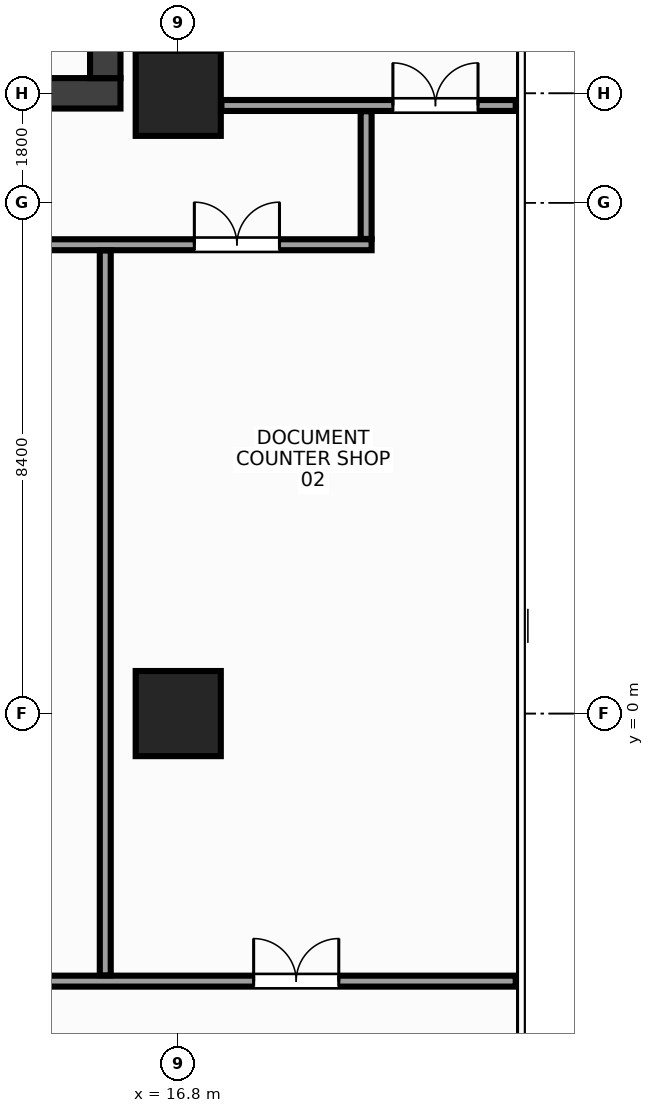
"""IFC4 building model, lengths in metres.
Left out: names, types, materials, properties, quantities, classifications, styles, units other than length and angle.
Written with IfcOpenShell. Run it as: python <this file> out.ifc"""

import sys

from ifc_helpers import new_model, si_unit, direction, frame, frame_2d, origin, origin_2d, place, context, subcontext, project, spatial, rectangle, extrude, source, transform, mapped, element, fill, save


model = new_model("IFC4")
c1 = context("Model", 3, precision=1e-05, world=origin(), true_north=direction((0.0, 1.0)))
c2 = subcontext(c1, "Body", "Model", "MODEL_VIEW")
j1 = project(units=[si_unit("LENGTHUNIT", "METRE"), si_unit("PLANEANGLEUNIT", "RADIAN")], contexts=[c1])
p1 = place(None, origin())
s1 = spatial("IfcSite", under=j1, at=p1, CompositionType="ELEMENT")
p2 = place(p1, origin())
s2 = spatial("IfcBuilding", under=s1, at=p2, CompositionType="ELEMENT")
p3 = place(p2, frame((0.0, 0.0, 264.8)))
s3 = spatial("IfcBuildingStorey", under=s2, at=p3, CompositionType="ELEMENT", Elevation=264.8)
m1 = source(origin(), c2, "Body", "SweptSolid", [
    extrude(rectangle(XDim=31.7, YDim=0.5, at=frame_2d((15.85, 0.0))), origin(), (0.0, 0.0, 1.0), 3.6),
])
p4 = place(p3, frame((-15.85, 10.2, 0.0), z_axis=(0.0, 0.0, 1.0), x_axis=(1.0, 0.0, 0.0)))
e1 = element("IfcWall", 1, at=p4, inside=s3, PredefinedType="SHEAR", context=c2, shape_type="MappedRepresentation", body=[
    mapped(m1, transform((0.0, 0.0, 0.0), x_axis=(1.0, 0.0, 0.0), y_axis=(0.0, 1.0, 0.0), z_axis=(0.0, 0.0, 1.0), scale=1.0)),
])
p5 = place(p4, frame((1.7, 0.0, 0.0)))
e2 = element("IfcOpeningElement", 2, at=p5, cuts=e1, PredefinedType="OPENING", context=c2, shape_type="SweptSolid", body=[
    extrude(rectangle(XDim=1.6, YDim=2.15, at=frame_2d((0.8, 1.075))), frame((0.0, 0.262, 0.0), z_axis=(0.0, -1.0, 0.0), x_axis=(1.0, 0.0, 0.0)), (0.0, 0.0, 1.0), 0.524),
])
p6 = place(p4, frame((28.4, 0.0, 0.0)))
e3 = element("IfcOpeningElement", 3, at=p6, cuts=e1, PredefinedType="OPENING", context=c2, shape_type="SweptSolid", body=[
    extrude(rectangle(XDim=1.6, YDim=2.15, at=frame_2d((0.8, 1.075))), frame((0.0, 0.262, 0.0), z_axis=(0.0, -1.0, 0.0), x_axis=(1.0, 0.0, 0.0)), (0.0, 0.0, 1.0), 0.524),
])
p7 = place(p4, frame((15.1, 0.0, 0.0)))
e4 = element("IfcOpeningElement", 4, at=p7, cuts=e1, PredefinedType="OPENING", context=c2, shape_type="SweptSolid", body=[
    extrude(rectangle(XDim=1.5, YDim=2.2, at=frame_2d((0.75, 1.1))), frame((0.0, 0.262, 0.0), z_axis=(0.0, -1.0, 0.0), x_axis=(1.0, 0.0, 0.0)), (0.0, 0.0, 1.0), 0.524),
])
m2 = source(origin(), c2, "Body", "SweptSolid", [
    extrude(rectangle(XDim=13.1, YDim=0.5, at=frame_2d((6.55, 0.0))), origin(), (0.0, 0.0, 1.0), 3.6),
])
p8 = place(p3, frame((15.6, 10.45, 0.0), z_axis=(0.0, 0.0, 1.0), x_axis=(0.0, 1.0, 0.0)))
e5 = element("IfcWall", 5, at=p8, inside=s3, PredefinedType="SHEAR", context=c2, shape_type="MappedRepresentation", body=[
    mapped(m2, transform((0.0, 0.0, 0.0), x_axis=(1.0, 0.0, 0.0), y_axis=(0.0, 1.0, 0.0), z_axis=(0.0, 0.0, 1.0), scale=1.0)),
])
m3 = source(origin(), c2, "Body", "SweptSolid", [
    extrude(rectangle(XDim=1.4, YDim=1.4, at=origin_2d()), origin(), (0.0, 0.0, 1.0), 3.6),
])
for number, where, z_axis, x_axis in (
    (6, (16.8, 0.0, 0.0), (0.0, 0.0, 1.0), (1.0, 0.0, 0.0)),
    (7, (16.8, 10.2, 0.0), (0.0, 0.0, 1.0), (1.0, 0.0, 0.0)),
):
    element("IfcColumn", number, at=place(p3, frame(where, z_axis=z_axis, x_axis=x_axis)), inside=s3, PredefinedType="COLUMN", context=c2, shape_type="MappedRepresentation", body=[
        mapped(m3, transform((0.0, 0.0, 0.0), x_axis=(1.0, 0.0, 0.0), y_axis=(0.0, 1.0, 0.0), z_axis=(0.0, 0.0, 1.0), scale=1.0)),
    ])
m4 = source(origin(), c2, "Body", "SweptSolid", [
    extrude(rectangle(XDim=4.84, YDim=0.18, at=frame_2d((2.42, 0.0))), origin(), (0.0, 0.0, 1.0), 3.37),
])
p9 = place(p3, frame((17.51, 10.0, 0.0), z_axis=(0.0, 0.0, 1.0), x_axis=(1.0, 0.0, 0.0)))
e8 = element("IfcWall", 8, at=p9, inside=s3, PredefinedType="PARTITIONING", context=c2, shape_type="MappedRepresentation", body=[
    mapped(m4, transform((0.0, 0.0, 0.0), x_axis=(1.0, 0.0, 0.0), y_axis=(0.0, 1.0, 0.0), z_axis=(0.0, 0.0, 1.0), scale=1.0)),
])
p10 = place(p9, frame((2.82, 0.0, 0.0)))
e9 = element("IfcOpeningElement", 9, at=p10, cuts=e8, PredefinedType="OPENING", context=c2, shape_type="SweptSolid", body=[
    extrude(rectangle(XDim=1.4, YDim=2.2, at=frame_2d((0.7, 1.1))), frame((0.0, 0.102, 0.0), z_axis=(0.0, -1.0, 0.0), x_axis=(1.0, 0.0, 0.0)), (0.0, 0.0, 1.0), 0.204),
])
m5 = source(origin(), c2, "Body", "SweptSolid", [
    extrude(rectangle(XDim=21.9, YDim=0.18, at=frame_2d((10.95, 0.0))), origin(), (0.0, 0.0, 1.0), 2.755),
])
p11 = place(p3, frame((-1.92, 7.71, 0.0), z_axis=(0.0, 0.0, 1.0), x_axis=(1.0, 0.0, 0.0)))
e10 = element("IfcWall", 10, at=p11, inside=s3, PredefinedType="PARTITIONING", context=c2, shape_type="MappedRepresentation", body=[
    mapped(m5, transform((0.0, 0.0, 0.0), x_axis=(1.0, 0.0, 0.0), y_axis=(0.0, 1.0, 0.0), z_axis=(0.0, 0.0, 1.0), scale=1.0)),
])
p12 = place(p11, frame((18.985, 0.0, 0.0)))
e11 = element("IfcOpeningElement", 11, at=p12, cuts=e10, PredefinedType="OPENING", context=c2, shape_type="SweptSolid", body=[
    extrude(rectangle(XDim=1.4, YDim=2.2, at=frame_2d((0.7, 1.1))), frame((0.0, 0.102, 0.0), z_axis=(0.0, -1.0, 0.0), x_axis=(1.0, 0.0, 0.0)), (0.0, 0.0, 1.0), 0.204),
])
p13 = place(p11, frame((2.675, 0.0, 0.0)))
e12 = element("IfcOpeningElement", 12, at=p13, cuts=e10, PredefinedType="OPENING", context=c2, shape_type="SweptSolid", body=[
    extrude(rectangle(XDim=1.4, YDim=2.2, at=frame_2d((0.7, 1.1))), frame((0.0, 0.102, 0.0), z_axis=(0.0, -1.0, 0.0), x_axis=(1.0, 0.0, 0.0)), (0.0, 0.0, 1.0), 0.204),
])
p14 = place(p11, frame((11.42, 0.0, 0.0)))
e13 = element("IfcOpeningElement", 13, at=p14, cuts=e10, PredefinedType="OPENING", context=c2, shape_type="SweptSolid", body=[
    extrude(rectangle(XDim=1.4, YDim=2.2, at=frame_2d((0.7, 1.1))), frame((0.0, 0.102, 0.0), z_axis=(0.0, -1.0, 0.0), x_axis=(1.0, 0.0, 0.0)), (0.0, 0.0, 1.0), 0.204),
])
m6 = source(origin(), c2, "Body", "SweptSolid", [
    extrude(rectangle(XDim=2.1, YDim=0.18, at=frame_2d((1.05, 0.0))), origin(), (0.0, 0.0, 1.0), 3.37),
])
p15 = place(p3, frame((19.89, 7.805, 0.0), z_axis=(0.0, 0.0, 1.0), x_axis=(0.0, 1.0, 0.0)))
e14 = element("IfcWall", 14, at=p15, inside=s3, PredefinedType="PARTITIONING", context=c2, shape_type="MappedRepresentation", body=[
    mapped(m6, transform((0.0, 0.0, 0.0), x_axis=(1.0, 0.0, 0.0), y_axis=(0.0, 1.0, 0.0), z_axis=(0.0, 0.0, 1.0), scale=1.0)),
])
m7 = source(origin(), c2, "Body", "SweptSolid", [
    extrude(rectangle(XDim=24.265, YDim=0.18, at=frame_2d((12.133, 0.0))), origin(), (0.0, 0.0, 1.0), 2.755),
])
p16 = place(p3, frame((-1.915, -4.4, 0.0), z_axis=(0.0, 0.0, 1.0), x_axis=(1.0, 0.0, 0.0)))
e15 = element("IfcWall", 15, at=p16, inside=s3, PredefinedType="PARTITIONING", context=c2, shape_type="MappedRepresentation", body=[
    mapped(m7, transform((0.0, 0.0, 0.0), x_axis=(1.0, 0.0, 0.0), y_axis=(0.0, 1.0, 0.0), z_axis=(0.0, 0.0, 1.0), scale=1.0)),
])
p17 = place(p16, frame((19.955, 0.0, 0.0)))
e16 = element("IfcOpeningElement", 16, at=p17, cuts=e15, PredefinedType="OPENING", context=c2, shape_type="SweptSolid", body=[
    extrude(rectangle(XDim=1.4, YDim=2.2, at=frame_2d((0.7, 1.1))), frame((0.0, 0.102, 0.0), z_axis=(0.0, -1.0, 0.0), x_axis=(1.0, 0.0, 0.0)), (0.0, 0.0, 1.0), 0.204),
])
m8 = source(origin(), c2, "Body", "SweptSolid", [
    extrude(rectangle(XDim=11.92, YDim=0.18, at=frame_2d((5.96, 0.0))), origin(), (0.0, 0.0, 1.0), 2.655),
])
p18 = place(p3, frame((15.6, -4.305, 0.0), z_axis=(0.0, 0.0, 1.0), x_axis=(0.0, 1.0, 0.0)))
e17 = element("IfcWall", 17, at=p18, inside=s3, PredefinedType="PARTITIONING", context=c2, shape_type="MappedRepresentation", body=[
    mapped(m8, transform((0.0, 0.0, 0.0), x_axis=(1.0, 0.0, 0.0), y_axis=(0.0, 1.0, 0.0), z_axis=(0.0, 0.0, 1.0), scale=1.0)),
])
m9 = source(origin(), c2, "Body", "SweptSolid", [
    extrude(rectangle(XDim=1.4, YDim=2.2, at=frame_2d((0.7, 1.1))), frame((0.0, 0.025, 0.0), z_axis=(0.0, -1.0, 0.0), x_axis=(1.0, 0.0, 0.0)), (0.0, 0.0, 1.0), 0.05),
])
p19 = place(p12, origin())
e18 = element("IfcDoor", 18, at=p19, inside=s3, OperationType="DOUBLE_DOOR_SINGLE_SWING", PredefinedType="DOOR", context=c2, shape_type="MappedRepresentation", body=[
    mapped(m9, transform((0.0, 0.0, 0.0), x_axis=(1.0, 0.0, 0.0), y_axis=(0.0, 1.0, 0.0), z_axis=(0.0, 0.0, 1.0), scale=1.0)),
])
fill(e11, e18)
p20 = place(p10, origin())
e19 = element("IfcDoor", 19, at=p20, inside=s3, OperationType="DOUBLE_DOOR_SINGLE_SWING", PredefinedType="DOOR", context=c2, shape_type="MappedRepresentation", body=[
    mapped(m9, transform((0.0, 0.0, 0.0), x_axis=(1.0, 0.0, 0.0), y_axis=(0.0, 1.0, 0.0), z_axis=(0.0, 0.0, 1.0), scale=1.0)),
])
fill(e9, e19)
p21 = place(p17, origin())
e20 = element("IfcDoor", 20, at=p21, inside=s3, OperationType="DOUBLE_DOOR_SINGLE_SWING", PredefinedType="DOOR", context=c2, shape_type="MappedRepresentation", body=[
    mapped(m9, transform((0.0, 0.0, 0.0), x_axis=(1.0, 0.0, 0.0), y_axis=(0.0, 1.0, 0.0), z_axis=(0.0, 0.0, 1.0), scale=1.0)),
])
fill(e16, e20)
save(model, sys.argv[1])
